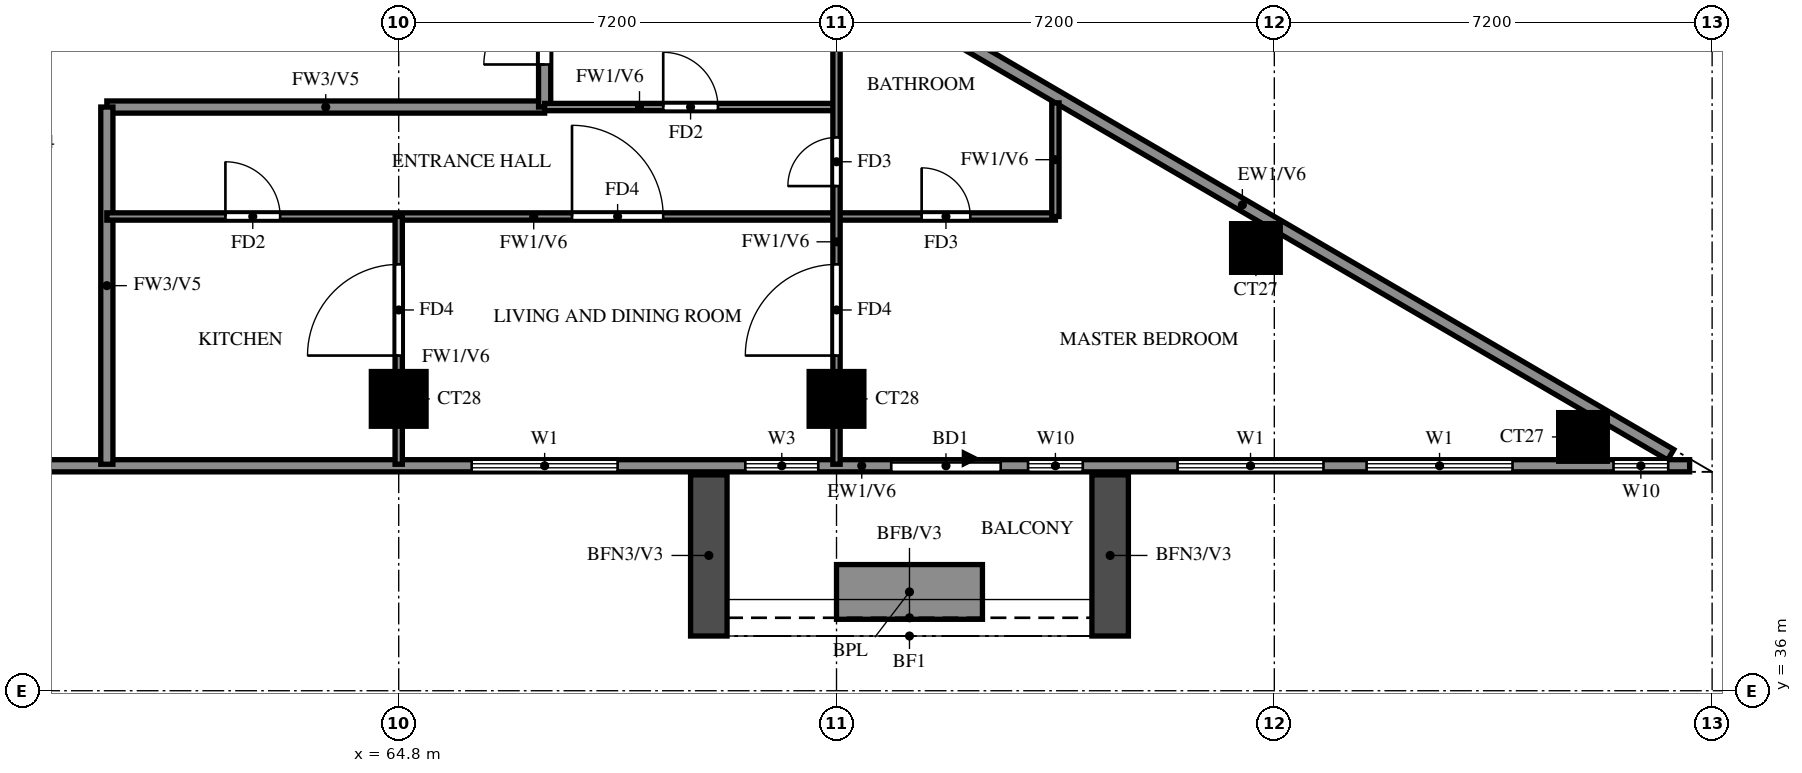
"""IFC4 building model, lengths in metres.
Left out: names, types, materials, properties, quantities, classifications, styles, units other than length and angle.
Written with IfcOpenShell. Run it as: python <this file> out.ifc"""

import sys

from ifc_helpers import new_model, si_unit, direction, frame, frame_2d, origin, origin_2d, place, context, subcontext, project, spatial, rectangle, extrude, source, transform, mapped, element, fill, save


model = new_model("IFC4")
c1 = context("Model", 3, precision=1e-05, world=origin(), true_north=direction((0.0, 1.0)))
c2 = subcontext(c1, "Body", "Model", "MODEL_VIEW")
j1 = project(units=[si_unit("LENGTHUNIT", "METRE"), si_unit("PLANEANGLEUNIT", "RADIAN")], contexts=[c1])
p1 = place(None, origin())
s1 = spatial("IfcSite", under=j1, at=p1, CompositionType="ELEMENT")
p2 = place(p1, origin())
s2 = spatial("IfcBuilding", under=s1, at=p2, CompositionType="ELEMENT")
p3 = place(p2, frame((0.0, 0.0, 202.5)))
s3 = spatial("IfcBuildingStorey", under=s2, at=p3, CompositionType="ELEMENT", Elevation=202.5)
m1 = source(origin(), c2, "Body", "SweptSolid", [
    extrude(rectangle(XDim=0.8, YDim=0.8, at=origin_2d()), origin(), (0.0, 0.0, 1.0), 3.1),
])
p4 = place(p3, frame((84.276, 40.174, 0.0), z_axis=(0.0, 0.0, 1.0), x_axis=(1.0, 0.0, 0.0)))
e1 = element("IfcColumn", 1, at=p4, inside=s3, PredefinedType="COLUMN", context=c2, shape_type="MappedRepresentation", body=[
    mapped(m1, transform((0.0, 0.0, 0.0))),
])
m2 = source(origin(), c2, "Body", "SweptSolid", [
    extrude(rectangle(XDim=0.9, YDim=0.9, at=origin_2d()), origin(), (0.0, 0.0, 1.0), 3.1),
])
for number, where, z_axis, x_axis in (
    (2, (64.8, 40.8, 0.0), (0.0, 0.0, 1.0), (1.0, 0.0, 0.0)),
    (3, (72.0, 40.8, 0.0), (0.0, 0.0, 1.0), (1.0, 0.0, 0.0)),
):
    element("IfcColumn", number, at=place(p3, frame(where, z_axis=z_axis, x_axis=x_axis)), inside=s3, PredefinedType="COLUMN", context=c2, shape_type="MappedRepresentation", body=[
        mapped(m2, transform((0.0, 0.0, 0.0))),
    ])
p5 = place(p3, frame((78.898, 43.282, 0.0), z_axis=(0.0, 0.0, 1.0), x_axis=(1.0, 0.0, 0.0)))
e4 = element("IfcColumn", 4, at=p5, inside=s3, PredefinedType="COLUMN", context=c2, shape_type="MappedRepresentation", body=[
    mapped(m1, transform((0.0, 0.0, 0.0))),
])
p6 = place(p3, frame((85.719, 39.881, 0.0), z_axis=(0.0, 0.0, 1.0), x_axis=(-0.86377618652, 0.503875678716, 0.0)))
e5 = element("IfcWall", 5, at=p6, inside=s3, PredefinedType="SOLIDWALL", context=c2, shape_type="SweptSolid", body=[
    extrude(rectangle(XDim=16.311, YDim=0.2, at=frame_2d((8.156, 0.0))), origin(), (0.0, 0.0, 1.0), 3.1),
])
p7 = place(p6, frame((13.326, 0.0, 1.5)))
e6 = element("IfcOpeningElement", 6, at=p7, cuts=e5, PredefinedType="OPENING", context=c2, shape_type="SweptSolid", body=[
    extrude(rectangle(XDim=0.9, YDim=0.9, at=frame_2d((0.45, 0.45))), frame((0.0, 0.11, 0.0), z_axis=(0.0, -1.0, 0.0), x_axis=(1.0, 0.0, 0.0)), (0.0, 0.0, 1.0), 0.22),
])
p8 = place(p3, frame((58.8, 39.7, 0.0), z_axis=(0.0, 0.0, 1.0), x_axis=(1.0, 0.0, 0.0)))
e7 = element("IfcWall", 7, at=p8, inside=s3, PredefinedType="SOLIDWALL", context=c2, shape_type="SweptSolid", body=[
    extrude(rectangle(XDim=27.23, YDim=0.2, at=frame_2d((13.615, 0.0))), origin(), (0.0, 0.0, 1.0), 3.1),
])
p9 = place(p8, frame((14.1, 0.0, 0.0)))
e8 = element("IfcOpeningElement", 8, at=p9, cuts=e7, PredefinedType="OPENING", context=c2, shape_type="SweptSolid", body=[
    extrude(rectangle(XDim=1.8, YDim=2.4, at=frame_2d((0.9, 1.2))), frame((0.0, 0.11, 0.0), z_axis=(0.0, -1.0, 0.0), x_axis=(1.0, 0.0, 0.0)), (0.0, 0.0, 1.0), 0.22),
])
p10 = place(p8, frame((7.2, 0.0, 0.6)))
e9 = element("IfcOpeningElement", 9, at=p10, cuts=e7, PredefinedType="OPENING", context=c2, shape_type="SweptSolid", body=[
    extrude(rectangle(XDim=2.4, YDim=2.4, at=frame_2d((1.2, 1.2))), frame((0.0, 0.11, 0.0), z_axis=(0.0, -1.0, 0.0), x_axis=(1.0, 0.0, 0.0)), (0.0, 0.0, 1.0), 0.22),
])
p11 = place(p8, frame((11.7, 0.0, 0.6)))
e10 = element("IfcOpeningElement", 10, at=p11, cuts=e7, PredefinedType="OPENING", context=c2, shape_type="SweptSolid", body=[
    extrude(rectangle(XDim=1.2, YDim=2.4, at=frame_2d((0.6, 1.2))), frame((0.0, 0.11, 0.0), z_axis=(0.0, -1.0, 0.0), x_axis=(1.0, 0.0, 0.0)), (0.0, 0.0, 1.0), 0.22),
])
p12 = place(p8, frame((16.35, 0.0, 0.6)))
e11 = element("IfcOpeningElement", 11, at=p12, cuts=e7, PredefinedType="OPENING", context=c2, shape_type="SweptSolid", body=[
    extrude(rectangle(XDim=0.9, YDim=2.4, at=frame_2d((0.45, 1.2))), frame((0.0, 0.11, 0.0), z_axis=(0.0, -1.0, 0.0), x_axis=(1.0, 0.0, 0.0)), (0.0, 0.0, 1.0), 0.22),
])
p13 = place(p8, frame((18.809, 0.0, 0.6)))
e12 = element("IfcOpeningElement", 12, at=p13, cuts=e7, PredefinedType="OPENING", context=c2, shape_type="SweptSolid", body=[
    extrude(rectangle(XDim=2.4, YDim=2.4, at=frame_2d((1.2, 1.2))), frame((0.0, 0.11, 0.0), z_axis=(0.0, -1.0, 0.0), x_axis=(1.0, 0.0, 0.0)), (0.0, 0.0, 1.0), 0.22),
])
p14 = place(p8, frame((21.917, 0.0, 0.6)))
e13 = element("IfcOpeningElement", 13, at=p14, cuts=e7, PredefinedType="OPENING", context=c2, shape_type="SweptSolid", body=[
    extrude(rectangle(XDim=2.4, YDim=2.4, at=frame_2d((1.2, 1.2))), frame((0.0, 0.11, 0.0), z_axis=(0.0, -1.0, 0.0), x_axis=(1.0, 0.0, 0.0)), (0.0, 0.0, 1.0), 0.22),
])
p15 = place(p8, frame((25.978, 0.0, 0.6)))
e14 = element("IfcOpeningElement", 14, at=p15, cuts=e7, PredefinedType="OPENING", context=c2, shape_type="SweptSolid", body=[
    extrude(rectangle(XDim=0.9, YDim=2.4, at=frame_2d((0.45, 1.2))), frame((0.0, 0.11, 0.0), z_axis=(0.0, -1.0, 0.0), x_axis=(1.0, 0.0, 0.0)), (0.0, 0.0, 1.0), 0.22),
])
for number, where, z_axis, x_axis in (
    (15, (69.9, 39.55, 0.0), (0.0, 0.0, 1.0), (0.0, -1.0, 0.0)),
    (16, (76.5, 39.55, 0.0), (0.0, 0.0, 1.0), (0.0, -1.0, 0.0)),
):
    element("IfcWall", number, at=place(p3, frame(where, z_axis=z_axis, x_axis=x_axis)), inside=s3, PredefinedType="SOLIDWALL", context=c2, shape_type="SweptSolid", body=[
        extrude(rectangle(XDim=2.65, YDim=0.6, at=frame_2d((1.325, 0.0))), origin(), (0.0, 0.0, 1.0), 2.75),
    ])
p16 = place(p3, frame((72.0, 37.625, 0.0), z_axis=(0.0, 0.0, 1.0), x_axis=(1.0, 0.0, 0.0)))
e17 = element("IfcWall", 17, at=p16, inside=s3, PredefinedType="SOLIDWALL", context=c2, shape_type="SweptSolid", body=[
    extrude(rectangle(XDim=2.4, YDim=0.9, at=frame_2d((1.2, 0.0))), origin(), (0.0, 0.0, 1.0), 0.9),
])
p17 = place(p3, frame((60.0, 45.6, 0.0), z_axis=(0.0, 0.0, 1.0), x_axis=(1.0, 0.0, 0.0)))
e18 = element("IfcWall", 18, at=p17, inside=s3, PredefinedType="SOLIDWALL", context=c2, shape_type="SweptSolid", body=[
    extrude(rectangle(XDim=7.2, YDim=0.2, at=frame_2d((3.6, 0.0))), origin(), (0.0, 0.0, 1.0), 3.1),
])
p18 = place(p3, frame((60.0, 39.725, 0.0), z_axis=(0.0, 0.0, 1.0), x_axis=(0.0, 1.0, 0.0)))
e19 = element("IfcWall", 19, at=p18, inside=s3, PredefinedType="SOLIDWALL", context=c2, shape_type="SweptSolid", body=[
    extrude(rectangle(XDim=5.875, YDim=0.2, at=frame_2d((2.938, 0.0))), origin(), (0.0, 0.0, 1.0), 3.1),
])
p19 = place(p3, frame((67.2, 45.6, 0.0), z_axis=(0.0, 0.0, 1.0), x_axis=(0.0, 1.0, 0.0)))
e20 = element("IfcWall", 20, at=p19, inside=s3, PredefinedType="SOLIDWALL", context=c2, shape_type="SweptSolid", body=[
    extrude(rectangle(XDim=10.8, YDim=0.2, at=frame_2d((5.4, 0.0))), origin(), (0.0, 0.0, 1.0), 3.1),
])
p20 = place(p19, frame((9.1, 0.0, 0.0)))
e21 = element("IfcOpeningElement", 21, at=p20, cuts=e20, PredefinedType="OPENING", context=c2, shape_type="SweptSolid", body=[
    extrude(rectangle(XDim=1.0, YDim=2.1, at=frame_2d((0.5, 1.05))), frame((0.0, 0.11, 0.0), z_axis=(0.0, -1.0, 0.0), x_axis=(1.0, 0.0, 0.0)), (0.0, 0.0, 1.0), 0.22),
])
p21 = place(p19, frame((0.7, 0.0, 0.0)))
e22 = element("IfcOpeningElement", 22, at=p21, cuts=e20, PredefinedType="OPENING", context=c2, shape_type="SweptSolid", body=[
    extrude(rectangle(XDim=1.0, YDim=2.1, at=frame_2d((0.5, 1.05))), frame((0.0, 0.11, 0.0), z_axis=(0.0, -1.0, 0.0), x_axis=(1.0, 0.0, 0.0)), (0.0, 0.0, 1.0), 0.22),
])
p22 = place(p3, frame((60.0, 43.8, 0.0), z_axis=(0.0, 0.0, 1.0), x_axis=(1.0, 0.0, 0.0)))
e23 = element("IfcWall", 23, at=p22, inside=s3, PredefinedType="PARTITIONING", context=c2, shape_type="SweptSolid", body=[
    extrude(rectangle(XDim=15.6, YDim=0.12, at=frame_2d((7.8, 0.0))), origin(), (0.0, 0.0, 1.0), 3.1),
])
p23 = place(p22, frame((7.65, 0.0, 0.0)))
e24 = element("IfcOpeningElement", 24, at=p23, cuts=e23, PredefinedType="OPENING", context=c2, shape_type="SweptSolid", body=[
    extrude(rectangle(XDim=1.5, YDim=2.1, at=frame_2d((0.75, 1.05))), frame((0.0, 0.07, 0.0), z_axis=(0.0, -1.0, 0.0), x_axis=(1.0, 0.0, 0.0)), (0.0, 0.0, 1.0), 0.14),
])
p24 = place(p22, frame((1.95, 0.0, 0.0)))
e25 = element("IfcOpeningElement", 25, at=p24, cuts=e23, PredefinedType="OPENING", context=c2, shape_type="SweptSolid", body=[
    extrude(rectangle(XDim=0.9, YDim=2.1, at=frame_2d((0.45, 1.05))), frame((0.0, 0.07, 0.0), z_axis=(0.0, -1.0, 0.0), x_axis=(1.0, 0.0, 0.0)), (0.0, 0.0, 1.0), 0.14),
])
p25 = place(p22, frame((13.4, 0.0, 0.0)))
e26 = element("IfcOpeningElement", 26, at=p25, cuts=e23, PredefinedType="OPENING", context=c2, shape_type="SweptSolid", body=[
    extrude(rectangle(XDim=0.8, YDim=2.1, at=frame_2d((0.4, 1.05))), frame((0.0, 0.07, 0.0), z_axis=(0.0, -1.0, 0.0), x_axis=(1.0, 0.0, 0.0)), (0.0, 0.0, 1.0), 0.14),
])
p26 = place(p3, frame((67.2, 45.6, 0.0), z_axis=(0.0, 0.0, 1.0), x_axis=(1.0, 0.0, 0.0)))
e27 = element("IfcWall", 27, at=p26, inside=s3, PredefinedType="PARTITIONING", context=c2, shape_type="SweptSolid", body=[
    extrude(rectangle(XDim=4.8, YDim=0.12, at=frame_2d((2.4, 0.0))), origin(), (0.0, 0.0, 1.0), 3.1),
])
p27 = place(p26, frame((1.95, 0.0, 0.0)))
e28 = element("IfcOpeningElement", 28, at=p27, cuts=e27, PredefinedType="OPENING", context=c2, shape_type="SweptSolid", body=[
    extrude(rectangle(XDim=0.9, YDim=2.1, at=frame_2d((0.45, 1.05))), frame((0.0, 0.07, 0.0), z_axis=(0.0, -1.0, 0.0), x_axis=(1.0, 0.0, 0.0)), (0.0, 0.0, 1.0), 0.14),
])
p28 = place(p3, frame((64.8, 39.725, 0.0), z_axis=(0.0, 0.0, 1.0), x_axis=(0.0, 1.0, 0.0)))
e29 = element("IfcWall", 29, at=p28, inside=s3, PredefinedType="PARTITIONING", context=c2, shape_type="SweptSolid", body=[
    extrude(rectangle(XDim=4.075, YDim=0.12, at=frame_2d((2.038, 0.0))), origin(), (0.0, 0.0, 1.0), 3.1),
])
p29 = place(p28, frame((1.788, 0.0, 0.0)))
e30 = element("IfcOpeningElement", 30, at=p29, cuts=e29, PredefinedType="OPENING", context=c2, shape_type="SweptSolid", body=[
    extrude(rectangle(XDim=1.5, YDim=2.1, at=frame_2d((0.75, 1.05))), frame((0.0, 0.07, 0.0), z_axis=(0.0, -1.0, 0.0), x_axis=(1.0, 0.0, 0.0)), (0.0, 0.0, 1.0), 0.14),
])
p30 = place(p3, frame((72.0, 39.725, 0.0), z_axis=(0.0, 0.0, 1.0), x_axis=(0.0, 1.0, 0.0)))
e31 = element("IfcWall", 31, at=p30, inside=s3, PredefinedType="PARTITIONING", context=c2, shape_type="SweptSolid", body=[
    extrude(rectangle(XDim=8.13, YDim=0.12, at=frame_2d((4.065, 0.0))), origin(), (0.0, 0.0, 1.0), 3.1),
])
p31 = place(p30, frame((1.788, 0.0, 0.0)))
e32 = element("IfcOpeningElement", 32, at=p31, cuts=e31, PredefinedType="OPENING", context=c2, shape_type="SweptSolid", body=[
    extrude(rectangle(XDim=1.5, YDim=2.1, at=frame_2d((0.75, 1.05))), frame((0.0, 0.07, 0.0), z_axis=(0.0, -1.0, 0.0), x_axis=(1.0, 0.0, 0.0)), (0.0, 0.0, 1.0), 0.14),
])
p32 = place(p30, frame((4.575, 0.0, 0.0)))
e33 = element("IfcOpeningElement", 33, at=p32, cuts=e31, PredefinedType="OPENING", context=c2, shape_type="SweptSolid", body=[
    extrude(rectangle(XDim=0.8, YDim=2.1, at=frame_2d((0.4, 1.05))), frame((0.0, 0.07, 0.0), z_axis=(0.0, -1.0, 0.0), x_axis=(1.0, 0.0, 0.0)), (0.0, 0.0, 1.0), 0.14),
])
p33 = place(p3, frame((75.6, 43.8, 0.0), z_axis=(0.0, 0.0, 1.0), x_axis=(0.0, 1.0, 0.0)))
e34 = element("IfcWall", 34, at=p33, inside=s3, PredefinedType="PARTITIONING", context=c2, shape_type="SweptSolid", body=[
    extrude(rectangle(XDim=1.868, YDim=0.12, at=frame_2d((0.934, 0.0))), origin(), (0.0, 0.0, 1.0), 3.1),
])
p34 = place(p9, origin())
e35 = element("IfcDoor", 35, at=p34, inside=s3, OperationType="DOUBLE_DOOR_SLIDING", PredefinedType="DOOR", context=c2, shape_type="SweptSolid", body=[
    extrude(rectangle(XDim=1.8, YDim=2.4, at=frame_2d((0.9, 1.2))), frame((0.0, 0.025, 0.0), z_axis=(0.0, -1.0, 0.0), x_axis=(1.0, 0.0, 0.0)), (0.0, 0.0, 1.0), 0.05),
])
fill(e8, e35)
p35 = place(p10, origin())
e36 = element("IfcWindow", 36, at=p35, inside=s3, PartitioningType="DOUBLE_PANEL_VERTICAL", PredefinedType="WINDOW", context=c2, shape_type="SweptSolid", body=[
    extrude(rectangle(XDim=2.4, YDim=2.4, at=frame_2d((1.2, 1.2))), frame((0.0, 0.03, 0.0), z_axis=(0.0, -1.0, 0.0), x_axis=(1.0, 0.0, 0.0)), (0.0, 0.0, 1.0), 0.06),
])
fill(e9, e36)
p36 = place(p11, origin())
e37 = element("IfcWindow", 37, at=p36, inside=s3, PartitioningType="SINGLE_PANEL", PredefinedType="WINDOW", context=c2, shape_type="SweptSolid", body=[
    extrude(rectangle(XDim=1.2, YDim=2.4, at=frame_2d((0.6, 1.2))), frame((0.0, 0.03, 0.0), z_axis=(0.0, -1.0, 0.0), x_axis=(1.0, 0.0, 0.0)), (0.0, 0.0, 1.0), 0.06),
])
fill(e10, e37)
p37 = place(p12, origin())
e38 = element("IfcWindow", 38, at=p37, inside=s3, PartitioningType="SINGLE_PANEL", PredefinedType="WINDOW", context=c2, shape_type="SweptSolid", body=[
    extrude(rectangle(XDim=0.9, YDim=2.4, at=frame_2d((0.45, 1.2))), frame((0.0, 0.03, 0.0), z_axis=(0.0, -1.0, 0.0), x_axis=(1.0, 0.0, 0.0)), (0.0, 0.0, 1.0), 0.06),
])
fill(e11, e38)
p38 = place(p13, origin())
e39 = element("IfcWindow", 39, at=p38, inside=s3, PartitioningType="DOUBLE_PANEL_VERTICAL", PredefinedType="WINDOW", context=c2, shape_type="SweptSolid", body=[
    extrude(rectangle(XDim=2.4, YDim=2.4, at=frame_2d((1.2, 1.2))), frame((0.0, 0.03, 0.0), z_axis=(0.0, -1.0, 0.0), x_axis=(1.0, 0.0, 0.0)), (0.0, 0.0, 1.0), 0.06),
])
fill(e12, e39)
p39 = place(p14, origin())
e40 = element("IfcWindow", 40, at=p39, inside=s3, PartitioningType="DOUBLE_PANEL_VERTICAL", PredefinedType="WINDOW", context=c2, shape_type="SweptSolid", body=[
    extrude(rectangle(XDim=2.4, YDim=2.4, at=frame_2d((1.2, 1.2))), frame((0.0, 0.03, 0.0), z_axis=(0.0, -1.0, 0.0), x_axis=(1.0, 0.0, 0.0)), (0.0, 0.0, 1.0), 0.06),
])
fill(e13, e40)
p40 = place(p15, origin())
e41 = element("IfcWindow", 41, at=p40, inside=s3, PartitioningType="SINGLE_PANEL", PredefinedType="WINDOW", context=c2, shape_type="SweptSolid", body=[
    extrude(rectangle(XDim=0.9, YDim=2.4, at=frame_2d((0.45, 1.2))), frame((0.0, 0.03, 0.0), z_axis=(0.0, -1.0, 0.0), x_axis=(1.0, 0.0, 0.0)), (0.0, 0.0, 1.0), 0.06),
])
fill(e14, e41)
p41 = place(p29, origin())
e42 = element("IfcDoor", 42, at=p41, inside=s3, OperationType="SINGLE_SWING_LEFT", PredefinedType="DOOR", context=c2, shape_type="SweptSolid", body=[
    extrude(rectangle(XDim=1.5, YDim=2.1, at=frame_2d((0.75, 1.05))), frame((0.0, 0.025, 0.0), z_axis=(0.0, -1.0, 0.0), x_axis=(1.0, 0.0, 0.0)), (0.0, 0.0, 1.0), 0.05),
])
fill(e30, e42)
p42 = place(p27, origin())
e43 = element("IfcDoor", 43, at=p42, inside=s3, OperationType="SINGLE_SWING_LEFT", PredefinedType="DOOR", context=c2, shape_type="SweptSolid", body=[
    extrude(rectangle(XDim=0.9, YDim=2.1, at=frame_2d((0.45, 1.05))), frame((0.0, 0.025, 0.0), z_axis=(0.0, -1.0, 0.0), x_axis=(1.0, 0.0, 0.0)), (0.0, 0.0, 1.0), 0.05),
])
fill(e28, e43)
p43 = place(p21, origin())
e44 = element("IfcDoor", 44, at=p43, inside=s3, OperationType="SINGLE_SWING_LEFT", PredefinedType="DOOR", context=c2, shape_type="SweptSolid", body=[
    extrude(rectangle(XDim=1.0, YDim=2.1, at=frame_2d((0.5, 1.05))), frame((0.0, 0.025, 0.0), z_axis=(0.0, -1.0, 0.0), x_axis=(1.0, 0.0, 0.0)), (0.0, 0.0, 1.0), 0.05),
])
fill(e22, e44)
p44 = place(p23, origin())
e45 = element("IfcDoor", 45, at=p44, inside=s3, OperationType="SINGLE_SWING_RIGHT", PredefinedType="DOOR", context=c2, shape_type="SweptSolid", body=[
    extrude(rectangle(XDim=1.5, YDim=2.1, at=frame_2d((0.75, 1.05))), frame((0.0, 0.025, 0.0), z_axis=(0.0, -1.0, 0.0), x_axis=(1.0, 0.0, 0.0)), (0.0, 0.0, 1.0), 0.05),
])
fill(e24, e45)
p45 = place(p24, origin())
e46 = element("IfcDoor", 46, at=p45, inside=s3, OperationType="SINGLE_SWING_LEFT", PredefinedType="DOOR", context=c2, shape_type="SweptSolid", body=[
    extrude(rectangle(XDim=0.9, YDim=2.1, at=frame_2d((0.45, 1.05))), frame((0.0, 0.025, 0.0), z_axis=(0.0, -1.0, 0.0), x_axis=(1.0, 0.0, 0.0)), (0.0, 0.0, 1.0), 0.05),
])
fill(e25, e46)
p46 = place(p31, origin())
e47 = element("IfcDoor", 47, at=p46, inside=s3, OperationType="SINGLE_SWING_RIGHT", PredefinedType="DOOR", context=c2, shape_type="SweptSolid", body=[
    extrude(rectangle(XDim=1.5, YDim=2.1, at=frame_2d((0.75, 1.05))), frame((0.0, 0.025, 0.0), z_axis=(0.0, -1.0, 0.0), x_axis=(1.0, 0.0, 0.0)), (0.0, 0.0, 1.0), 0.05),
])
fill(e32, e47)
p47 = place(p32, origin())
e48 = element("IfcDoor", 48, at=p47, inside=s3, OperationType="SINGLE_SWING_RIGHT", PredefinedType="DOOR", context=c2, shape_type="SweptSolid", body=[
    extrude(rectangle(XDim=0.8, YDim=2.1, at=frame_2d((0.4, 1.05))), frame((0.0, 0.025, 0.0), z_axis=(0.0, -1.0, 0.0), x_axis=(1.0, 0.0, 0.0)), (0.0, 0.0, 1.0), 0.05),
])
fill(e33, e48)
p48 = place(p25, origin())
e49 = element("IfcDoor", 49, at=p48, inside=s3, OperationType="SINGLE_SWING_LEFT", PredefinedType="DOOR", context=c2, shape_type="SweptSolid", body=[
    extrude(rectangle(XDim=0.8, YDim=2.1, at=frame_2d((0.4, 1.05))), frame((0.0, 0.025, 0.0), z_axis=(0.0, -1.0, 0.0), x_axis=(1.0, 0.0, 0.0)), (0.0, 0.0, 1.0), 0.05),
])
fill(e26, e49)
save(model, sys.argv[1])
